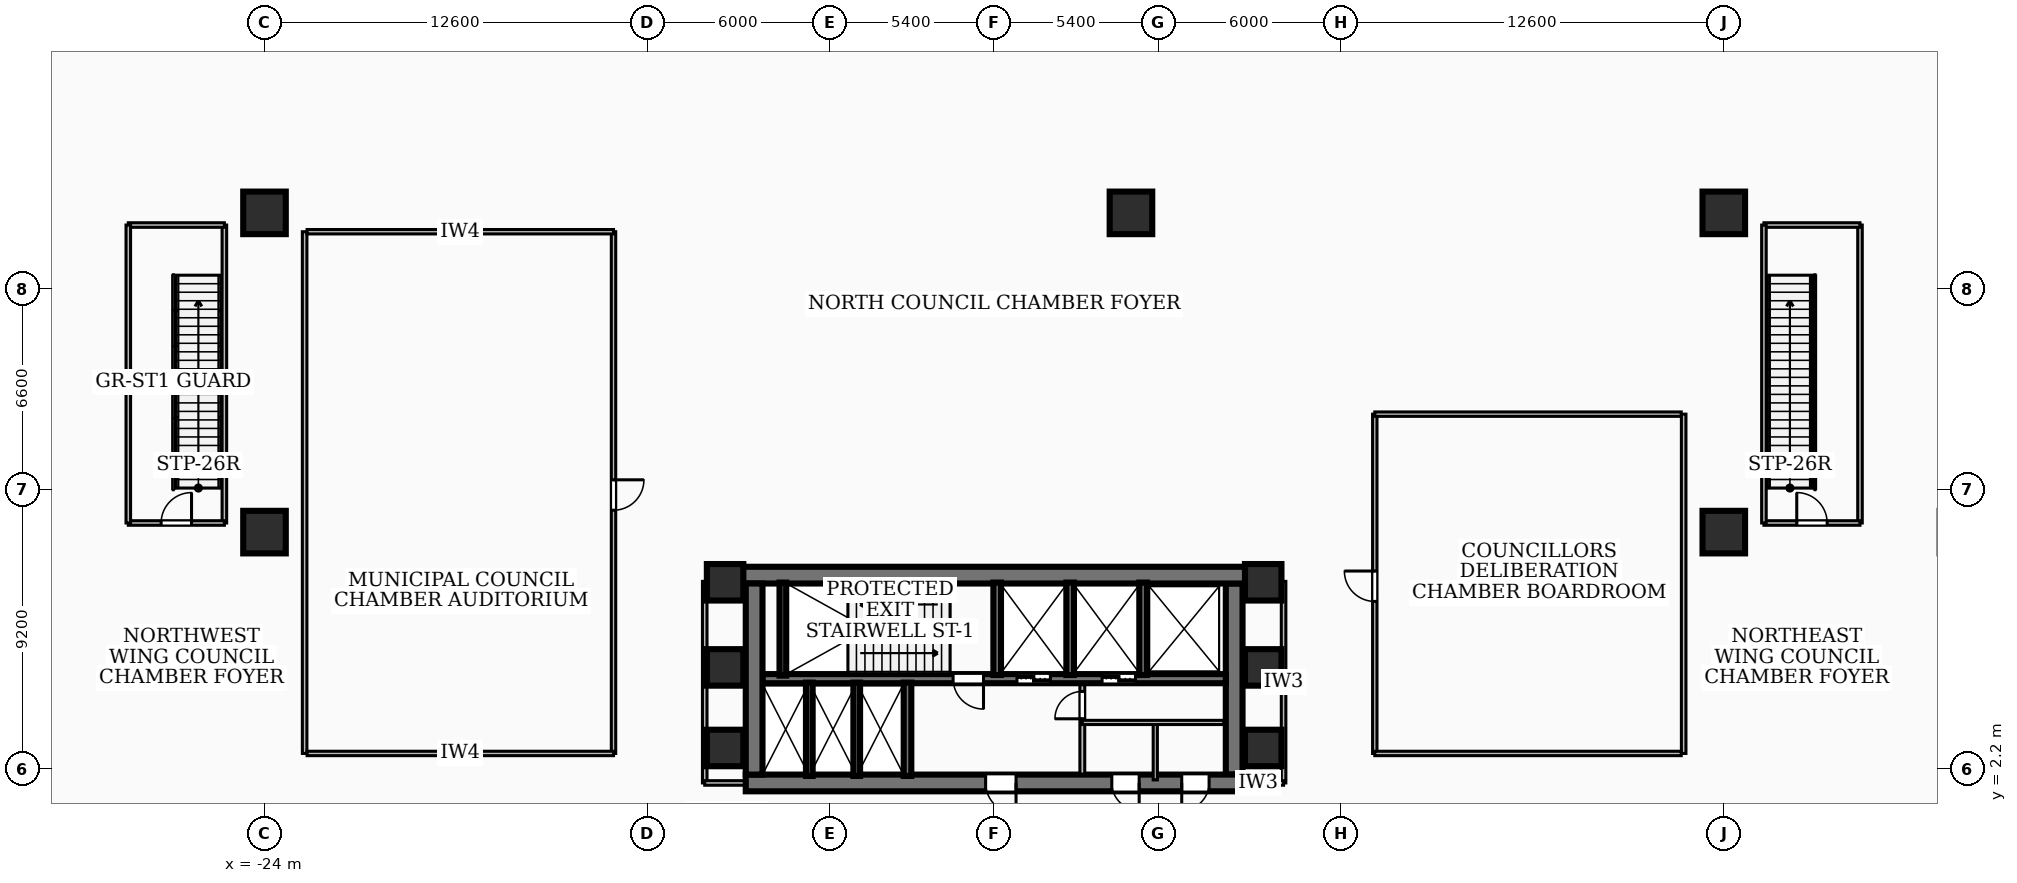
"""IFC4 building model, lengths in metres.
Left out: names, types, materials, properties, quantities, classifications, styles, units other than length and angle.
Written with IfcOpenShell. Run it as: python <this file> out.ifc"""

import sys

from ifc_helpers import new_model, si_unit, direction, frame, frame_2d, origin, origin_2d, place, context, subcontext, project, spatial, rectangle, extrude, element, fill, save


model = new_model("IFC4")
c1 = context("Model", 3, precision=1e-05, world=origin(), true_north=direction((0.0, 1.0)))
c2 = subcontext(c1, "Body", "Model", "MODEL_VIEW")
j1 = project(units=[si_unit("LENGTHUNIT", "METRE"), si_unit("PLANEANGLEUNIT", "RADIAN")], contexts=[c1])
p1 = place(None, origin())
s1 = spatial("IfcSite", under=j1, at=p1, CompositionType="ELEMENT")
p2 = place(p1, origin())
s2 = spatial("IfcBuilding", under=s1, at=p2, CompositionType="ELEMENT")
p3 = place(p2, frame((0.0, 0.0, 10.08)))
s3 = spatial("IfcBuildingStorey", under=s2, at=p3, CompositionType="ELEMENT", Elevation=10.08)
p4 = place(p3, frame((-8.78, 8.585, 0.0), z_axis=(0.0, 0.0, 1.0), x_axis=(1.0, 0.0, 0.0)))
e1 = element("IfcWall", 1, at=p4, inside=s3, PredefinedType="SHEAR", context=c2, shape_type="SweptSolid", body=[
    extrude(rectangle(XDim=17.56, YDim=0.55, at=frame_2d((8.78, 0.0))), origin(), (0.0, 0.0, 1.0), 4.36),
])
p5 = place(p3, frame((8.17, 1.75, 0.0), z_axis=(0.0, 0.0, 1.0), x_axis=(-1.0, 0.0, 0.0)))
e2 = element("IfcWall", 2, at=p5, inside=s3, PredefinedType="SHEAR", context=c2, shape_type="SweptSolid", body=[
    extrude(rectangle(XDim=16.34, YDim=0.55, at=frame_2d((8.17, 0.0))), origin(), (0.0, 0.0, 1.0), 4.36),
])
p6 = place(p5, frame((7.45, 0.0, 0.0)))
e3 = element("IfcOpeningElement", 3, at=p6, cuts=e2, PredefinedType="OPENING", context=c2, shape_type="SweptSolid", body=[
    extrude(rectangle(XDim=1.0, YDim=2.1, at=frame_2d((0.5, 1.05))), frame((0.0, 0.285, 0.0), z_axis=(0.0, -1.0, 0.0), x_axis=(1.0, 0.0, 0.0)), (0.0, 0.0, 1.0), 0.57),
])
p7 = place(p5, frame((3.4, 0.0, 0.0)))
e4 = element("IfcOpeningElement", 4, at=p7, cuts=e2, PredefinedType="OPENING", context=c2, shape_type="SweptSolid", body=[
    extrude(rectangle(XDim=0.9, YDim=2.06, at=frame_2d((0.45, 1.03))), frame((0.0, 0.285, 0.0), z_axis=(0.0, -1.0, 0.0), x_axis=(1.0, 0.0, 0.0)), (0.0, 0.0, 1.0), 0.57),
])
p8 = place(p5, frame((1.1, 0.0, 0.0)))
e5 = element("IfcOpeningElement", 5, at=p8, cuts=e2, PredefinedType="OPENING", context=c2, shape_type="SweptSolid", body=[
    extrude(rectangle(XDim=0.9, YDim=2.06, at=frame_2d((0.45, 1.03))), frame((0.0, 0.285, 0.0), z_axis=(0.0, -1.0, 0.0), x_axis=(1.0, 0.0, 0.0)), (0.0, 0.0, 1.0), 0.57),
])
for number, where, z_axis, x_axis in (
    (6, (-7.895, 2.025, 0.0), (0.0, 0.0, 1.0), (0.0, 1.0, 0.0)),
    (7, (7.895, 8.31, 0.0), (0.0, 0.0, 1.0), (0.0, -1.0, 0.0)),
):
    element("IfcWall", number, at=place(p3, frame(where, z_axis=z_axis, x_axis=x_axis)), inside=s3, PredefinedType="SHEAR", context=c2, shape_type="SweptSolid", body=[
        extrude(rectangle(XDim=6.285, YDim=0.55, at=frame_2d((3.143, 0.0))), origin(), (0.0, 0.0, 1.0), 4.36),
    ])
p9 = place(p3, frame((7.62, 5.18, 0.0), z_axis=(0.0, 0.0, 1.0), x_axis=(-1.0, 0.0, 0.0)))
e8 = element("IfcWall", 8, at=p9, inside=s3, PredefinedType="SOLIDWALL", context=c2, shape_type="SweptSolid", body=[
    extrude(rectangle(XDim=15.24, YDim=0.3, at=frame_2d((7.62, 0.0))), origin(), (0.0, 0.0, 1.0), 4.36),
])
p10 = place(p9, frame((5.77, 0.0, 0.0)))
e9 = element("IfcOpeningElement", 9, at=p10, cuts=e8, PredefinedType="OPENING", context=c2, shape_type="SweptSolid", body=[
    extrude(rectangle(XDim=1.1, YDim=2.15, at=frame_2d((0.55, 1.075))), frame((0.0, 0.16, 0.0), z_axis=(0.0, -1.0, 0.0), x_axis=(1.0, 0.0, 0.0)), (0.0, 0.0, 1.0), 0.32),
])
p11 = place(p9, frame((2.97, 0.0, 0.0)))
e10 = element("IfcOpeningElement", 10, at=p11, cuts=e8, PredefinedType="OPENING", context=c2, shape_type="SweptSolid", body=[
    extrude(rectangle(XDim=1.1, YDim=2.15, at=frame_2d((0.55, 1.075))), frame((0.0, 0.16, 0.0), z_axis=(0.0, -1.0, 0.0), x_axis=(1.0, 0.0, 0.0)), (0.0, 0.0, 1.0), 0.32),
])
p12 = place(p9, frame((7.97, 0.0, 0.0)))
e11 = element("IfcOpeningElement", 11, at=p12, cuts=e8, PredefinedType="OPENING", context=c2, shape_type="SweptSolid", body=[
    extrude(rectangle(XDim=1.0, YDim=2.1, at=frame_2d((0.5, 1.05))), frame((0.0, 0.16, 0.0), z_axis=(0.0, -1.0, 0.0), x_axis=(1.0, 0.0, 0.0)), (0.0, 0.0, 1.0), 0.32),
])
p13 = place(p3, frame((-6.95, 5.28, 0.0), z_axis=(0.0, 0.0, 1.0), x_axis=(0.0, 1.0, 0.0)))
e12 = element("IfcWall", 12, at=p13, inside=s3, PredefinedType="SOLIDWALL", context=c2, shape_type="SweptSolid", body=[
    extrude(rectangle(XDim=3.06, YDim=0.22, at=frame_2d((1.53, 0.0))), origin(), (0.0, 0.0, 1.0), 4.36),
])
for number, where, z_axis, x_axis in (
    (13, (0.1, 5.3, 0.0), (0.0, 0.0, 1.0), (0.0, 1.0, 0.0)),
    (14, (2.5, 5.3, 0.0), (0.0, 0.0, 1.0), (0.0, 1.0, 0.0)),
    (15, (4.9, 5.3, 0.0), (0.0, 0.0, 1.0), (0.0, 1.0, 0.0)),
):
    element("IfcWall", number, at=place(p3, frame(where, z_axis=z_axis, x_axis=x_axis)), inside=s3, PredefinedType="SOLIDWALL", context=c2, shape_type="SweptSolid", body=[
        extrude(rectangle(XDim=3.04, YDim=0.25, at=frame_2d((1.52, 0.0))), origin(), (0.0, 0.0, 1.0), 4.36),
    ])
p14 = place(p3, frame((-2.85, 1.98, 0.0), z_axis=(0.0, 0.0, 1.0), x_axis=(0.0, 1.0, 0.0)))
e16 = element("IfcWall", 16, at=p14, inside=s3, PredefinedType="SOLIDWALL", context=c2, shape_type="SweptSolid", body=[
    extrude(rectangle(XDim=3.07, YDim=0.25, at=frame_2d((1.535, 0.0))), origin(), (0.0, 0.0, 1.0), 4.36),
])
for number, where, z_axis, x_axis in (
    (17, (-6.08, 1.98, 0.0), (0.0, 0.0, 1.0), (0.0, 1.0, 0.0)),
    (18, (-4.52, 1.98, 0.0), (0.0, 0.0, 1.0), (0.0, 1.0, 0.0)),
):
    element("IfcWall", number, at=place(p3, frame(where, z_axis=z_axis, x_axis=x_axis)), inside=s3, PredefinedType="SOLIDWALL", context=c2, shape_type="SweptSolid", body=[
        extrude(rectangle(XDim=3.07, YDim=0.22, at=frame_2d((1.535, 0.0))), origin(), (0.0, 0.0, 1.0), 4.36),
    ])
for number, where, z_axis, x_axis in (
    (19, (-8.85, 2.9, 0.0), (0.0, 0.0, 1.0), (1.0, 0.0, 0.0)),
    (20, (-8.85, 5.55, 0.0), (0.0, 0.0, 1.0), (1.0, 0.0, 0.0)),
    (21, (8.85, 2.9, 0.0), (0.0, 0.0, 1.0), (1.0, 0.0, 0.0)),
    (22, (8.85, 5.55, 0.0), (0.0, 0.0, 1.0), (1.0, 0.0, 0.0)),
    (23, (-8.85, 8.35, 0.0), (0.0, 0.0, 1.0), (1.0, 0.0, 0.0)),
    (24, (8.85, 8.35, 0.0), (0.0, 0.0, 1.0), (1.0, 0.0, 0.0)),
):
    element("IfcColumn", number, at=place(p3, frame(where, z_axis=z_axis, x_axis=x_axis)), inside=s3, PredefinedType="COLUMN", context=c2, shape_type="SweptSolid", body=[
        extrude(rectangle(XDim=1.2, YDim=1.2, at=origin_2d()), origin(), (0.0, 0.0, 1.0), 4.68),
    ])
for number, where, z_axis, x_axis in (
    (25, (-24.0, 10.0, 0.0), (0.0, 0.0, 1.0), (1.0, 0.0, 0.0)),
    (26, (24.0, 10.0, 0.0), (0.0, 0.0, 1.0), (1.0, 0.0, 0.0)),
    (27, (4.5, 20.5, 0.0), (0.0, 0.0, 1.0), (1.0, 0.0, 0.0)),
    (28, (-24.0, 20.5, 0.0), (0.0, 0.0, 1.0), (1.0, 0.0, 0.0)),
    (29, (24.0, 20.5, 0.0), (0.0, 0.0, 1.0), (1.0, 0.0, 0.0)),
):
    element("IfcColumn", number, at=place(p3, frame(where, z_axis=z_axis, x_axis=x_axis)), inside=s3, PredefinedType="COLUMN", context=c2, shape_type="SweptSolid", body=[
        extrude(rectangle(XDim=1.4, YDim=1.4, at=origin_2d()), origin(), (0.0, 0.0, 1.0), 4.68),
    ])
for number, where, z_axis, x_axis in (
    (30, (-28.48, 10.3, 0.0), (0.0, 0.0, 1.0), (0.0, 1.0, 0.0)),
    (31, (-25.32, 10.3, 0.0), (0.0, 0.0, 1.0), (0.0, 1.0, 0.0)),
):
    element("IfcWall", number, at=place(p3, frame(where, z_axis=z_axis, x_axis=x_axis)), inside=s3, PredefinedType="PARTITIONING", context=c2, shape_type="SweptSolid", body=[
        extrude(rectangle(XDim=9.8, YDim=0.15, at=frame_2d((4.9, 0.0))), origin(), (0.0, 0.0, 1.0), 4.36),
    ])
p15 = place(p3, frame((-28.48, 10.3, 0.0), z_axis=(0.0, 0.0, 1.0), x_axis=(1.0, 0.0, 0.0)))
e32 = element("IfcWall", 32, at=p15, inside=s3, PredefinedType="PARTITIONING", context=c2, shape_type="SweptSolid", body=[
    extrude(rectangle(XDim=3.16, YDim=0.15, at=frame_2d((1.58, 0.0))), origin(), (0.0, 0.0, 1.0), 3.37),
])
p16 = place(p15, frame((1.08, 0.0, 0.0)))
e33 = element("IfcOpeningElement", 33, at=p16, cuts=e32, PredefinedType="OPENING", context=c2, shape_type="SweptSolid", body=[
    extrude(rectangle(XDim=1.0, YDim=2.1, at=frame_2d((0.5, 1.05))), frame((0.0, 0.085, 0.0), z_axis=(0.0, -1.0, 0.0), x_axis=(1.0, 0.0, 0.0)), (0.0, 0.0, 1.0), 0.17),
])
p17 = place(p3, frame((-25.32, 20.1, 0.0), z_axis=(0.0, 0.0, 1.0), x_axis=(-1.0, 0.0, 0.0)))
e34 = element("IfcWall", 34, at=p17, inside=s3, PredefinedType="PARTITIONING", context=c2, shape_type="SweptSolid", body=[
    extrude(rectangle(XDim=3.16, YDim=0.15, at=frame_2d((1.58, 0.0))), origin(), (0.0, 0.0, 1.0), 4.36),
])
for number, where, z_axis, x_axis in (
    (35, (25.32, 10.3, 0.0), (0.0, 0.0, 1.0), (0.0, 1.0, 0.0)),
    (36, (28.48, 10.3, 0.0), (0.0, 0.0, 1.0), (0.0, 1.0, 0.0)),
):
    element("IfcWall", number, at=place(p3, frame(where, z_axis=z_axis, x_axis=x_axis)), inside=s3, PredefinedType="PARTITIONING", context=c2, shape_type="SweptSolid", body=[
        extrude(rectangle(XDim=9.8, YDim=0.15, at=frame_2d((4.9, 0.0))), origin(), (0.0, 0.0, 1.0), 4.36),
    ])
p18 = place(p3, frame((25.32, 10.3, 0.0), z_axis=(0.0, 0.0, 1.0), x_axis=(1.0, 0.0, 0.0)))
e37 = element("IfcWall", 37, at=p18, inside=s3, PredefinedType="PARTITIONING", context=c2, shape_type="SweptSolid", body=[
    extrude(rectangle(XDim=3.16, YDim=0.15, at=frame_2d((1.58, 0.0))), origin(), (0.0, 0.0, 1.0), 3.37),
])
p19 = place(p18, frame((1.08, 0.0, 0.0)))
e38 = element("IfcOpeningElement", 38, at=p19, cuts=e37, PredefinedType="OPENING", context=c2, shape_type="SweptSolid", body=[
    extrude(rectangle(XDim=1.0, YDim=2.1, at=frame_2d((0.5, 1.05))), frame((0.0, 0.085, 0.0), z_axis=(0.0, -1.0, 0.0), x_axis=(1.0, 0.0, 0.0)), (0.0, 0.0, 1.0), 0.17),
])
p20 = place(p3, frame((28.48, 20.1, 0.0), z_axis=(0.0, 0.0, 1.0), x_axis=(-1.0, 0.0, 0.0)))
e39 = element("IfcWall", 39, at=p20, inside=s3, PredefinedType="PARTITIONING", context=c2, shape_type="SweptSolid", body=[
    extrude(rectangle(XDim=3.16, YDim=0.15, at=frame_2d((1.58, 0.0))), origin(), (0.0, 0.0, 1.0), 4.36),
])
p21 = place(p3, frame((2.9, 2.04, 0.0), z_axis=(0.0, 0.0, 1.0), x_axis=(0.0, 1.0, 0.0)))
e40 = element("IfcWall", 40, at=p21, inside=s3, PredefinedType="PARTITIONING", context=c2, shape_type="SweptSolid", body=[
    extrude(rectangle(XDim=2.94, YDim=0.16, at=frame_2d((1.47, 0.0))), origin(), (0.0, 0.0, 1.0), 3.425),
])
p22 = place(p21, frame((1.82, 0.0, 0.0)))
e41 = element("IfcOpeningElement", 41, at=p22, cuts=e40, PredefinedType="OPENING", context=c2, shape_type="SweptSolid", body=[
    extrude(rectangle(XDim=0.9, YDim=2.06, at=frame_2d((0.45, 1.03))), frame((0.0, 0.09, 0.0), z_axis=(0.0, -1.0, 0.0), x_axis=(1.0, 0.0, 0.0)), (0.0, 0.0, 1.0), 0.18),
])
p23 = place(p3, frame((2.9, 3.74, 0.0), z_axis=(0.0, 0.0, 1.0), x_axis=(1.0, 0.0, 0.0)))
e42 = element("IfcWall", 42, at=p23, inside=s3, PredefinedType="PARTITIONING", context=c2, shape_type="SweptSolid", body=[
    extrude(rectangle(XDim=4.65, YDim=0.138, at=frame_2d((2.325, 0.0))), origin(), (0.0, 0.0, 1.0), 4.36),
])
p24 = place(p3, frame((5.3, 1.85, 0.0), z_axis=(0.0, 0.0, 1.0), x_axis=(0.0, 1.0, 0.0)))
e43 = element("IfcWall", 43, at=p24, inside=s3, PredefinedType="PARTITIONING", context=c2, shape_type="SweptSolid", body=[
    extrude(rectangle(XDim=1.89, YDim=0.138, at=frame_2d((0.945, 0.0))), origin(), (0.0, 0.0, 1.0), 3.425),
])
p25 = place(p3, frame((-9.52, 1.75, 0.0), z_axis=(0.0, 0.0, 1.0), x_axis=(0.0, 1.0, 0.0)))
e44 = element("IfcWall", 44, at=p25, inside=s3, PredefinedType="PARTITIONING", context=c2, shape_type="SweptSolid", body=[
    extrude(rectangle(XDim=6.63, YDim=0.15, at=frame_2d((3.315, 0.0))), origin(), (0.0, 0.0, 1.0), 3.37),
])
p26 = place(p3, frame((-7.85, 1.75, 0.0), z_axis=(0.0, 0.0, 1.0), x_axis=(-1.0, 0.0, 0.0)))
e45 = element("IfcWall", 45, at=p26, inside=s3, PredefinedType="PARTITIONING", context=c2, shape_type="SweptSolid", body=[
    extrude(rectangle(XDim=1.67, YDim=0.15, at=frame_2d((0.835, 0.0))), origin(), (0.0, 0.0, 1.0), 3.425),
])
p27 = place(p3, frame((9.52, 1.75, 0.0), z_axis=(0.0, 0.0, 1.0), x_axis=(0.0, 1.0, 0.0)))
e46 = element("IfcWall", 46, at=p27, inside=s3, PredefinedType="PARTITIONING", context=c2, shape_type="SweptSolid", body=[
    extrude(rectangle(XDim=6.63, YDim=0.15, at=frame_2d((3.315, 0.0))), origin(), (0.0, 0.0, 1.0), 3.37),
])
p28 = place(p3, frame((7.85, 1.75, 0.0), z_axis=(0.0, 0.0, 1.0), x_axis=(1.0, 0.0, 0.0)))
e47 = element("IfcWall", 47, at=p28, inside=s3, PredefinedType="PARTITIONING", context=c2, shape_type="SweptSolid", body=[
    extrude(rectangle(XDim=1.67, YDim=0.15, at=frame_2d((0.835, 0.0))), origin(), (0.0, 0.0, 1.0), 3.425),
])
p29 = place(p3, frame((-12.52, 19.88, 0.0), z_axis=(0.0, 0.0, 1.0), x_axis=(0.0, -1.0, 0.0)))
e48 = element("IfcWall", 48, at=p29, inside=s3, PredefinedType="PARTITIONING", context=c2, shape_type="SweptSolid", body=[
    extrude(rectangle(XDim=17.16, YDim=0.145, at=frame_2d((8.58, 0.0))), origin(), (0.0, 0.0, 1.0), 3.37),
])
p30 = place(p29, frame((8.16, 0.0, 0.0)))
e49 = element("IfcOpeningElement", 49, at=p30, cuts=e48, PredefinedType="OPENING", context=c2, shape_type="SweptSolid", body=[
    extrude(rectangle(XDim=1.0, YDim=2.1, at=frame_2d((0.5, 1.05))), frame((0.0, 0.083, 0.0), z_axis=(0.0, -1.0, 0.0), x_axis=(1.0, 0.0, 0.0)), (0.0, 0.0, 1.0), 0.165),
])
for number, where, z_axis, x_axis in (
    (50, (-22.6, 2.72, 0.0), (0.0, 0.0, 1.0), (1.0, 0.0, 0.0)),
    (51, (-22.6, 19.88, 0.0), (0.0, 0.0, 1.0), (1.0, 0.0, 0.0)),
):
    element("IfcWall", number, at=place(p3, frame(where, z_axis=z_axis, x_axis=x_axis)), inside=s3, PredefinedType="PARTITIONING", context=c2, shape_type="SweptSolid", body=[
        extrude(rectangle(XDim=10.08, YDim=0.145, at=frame_2d((5.04, 0.0))), origin(), (0.0, 0.0, 1.0), 4.36),
    ])
p31 = place(p3, frame((-22.68, 2.72, 0.0), z_axis=(0.0, 0.0, 1.0), x_axis=(0.0, 1.0, 0.0)))
e52 = element("IfcWall", 52, at=p31, inside=s3, PredefinedType="PARTITIONING", context=c2, shape_type="SweptSolid", body=[
    extrude(rectangle(XDim=17.16, YDim=0.15, at=frame_2d((8.58, 0.0))), origin(), (0.0, 0.0, 1.0), 3.37),
])
p32 = place(p3, frame((12.52, 2.72, 0.0), z_axis=(0.0, 0.0, 1.0), x_axis=(0.0, 1.0, 0.0)))
e53 = element("IfcWall", 53, at=p32, inside=s3, PredefinedType="PARTITIONING", context=c2, shape_type="SweptSolid", body=[
    extrude(rectangle(XDim=11.16, YDim=0.145, at=frame_2d((5.58, 0.0))), origin(), (0.0, 0.0, 1.0), 3.37),
])
p33 = place(p32, frame((5.0, 0.0, 0.0)))
e54 = element("IfcOpeningElement", 54, at=p33, cuts=e53, PredefinedType="OPENING", context=c2, shape_type="SweptSolid", body=[
    extrude(rectangle(XDim=1.0, YDim=2.1, at=frame_2d((0.5, 1.05))), frame((0.0, 0.083, 0.0), z_axis=(0.0, -1.0, 0.0), x_axis=(1.0, 0.0, 0.0)), (0.0, 0.0, 1.0), 0.165),
])
for number, where, z_axis, x_axis in (
    (55, (12.52, 2.72, 0.0), (0.0, 0.0, 1.0), (1.0, 0.0, 0.0)),
    (56, (12.52, 13.88, 0.0), (0.0, 0.0, 1.0), (1.0, 0.0, 0.0)),
):
    element("IfcWall", number, at=place(p3, frame(where, z_axis=z_axis, x_axis=x_axis)), inside=s3, PredefinedType="PARTITIONING", context=c2, shape_type="SweptSolid", body=[
        extrude(rectangle(XDim=10.08, YDim=0.145, at=frame_2d((5.04, 0.0))), origin(), (0.0, 0.0, 1.0), 4.36),
    ])
p34 = place(p3, frame((22.68, 2.72, 0.0), z_axis=(0.0, 0.0, 1.0), x_axis=(0.0, 1.0, 0.0)))
e57 = element("IfcWall", 57, at=p34, inside=s3, PredefinedType="PARTITIONING", context=c2, shape_type="SweptSolid", body=[
    extrude(rectangle(XDim=11.16, YDim=0.15, at=frame_2d((5.58, 0.0))), origin(), (0.0, 0.0, 1.0), 3.37),
])
p35 = place(p16, origin())
e58 = element("IfcDoor", 58, at=p35, inside=s3, OperationType="SINGLE_SWING_RIGHT", PredefinedType="DOOR", context=c2, shape_type="SweptSolid", body=[
    extrude(rectangle(XDim=1.0, YDim=2.1, at=frame_2d((0.5, 1.05))), frame((0.0, 0.025, 0.0), z_axis=(0.0, -1.0, 0.0), x_axis=(1.0, 0.0, 0.0)), (0.0, 0.0, 1.0), 0.05),
])
fill(e33, e58)
p36 = place(p19, origin())
e59 = element("IfcDoor", 59, at=p36, inside=s3, OperationType="SINGLE_SWING_LEFT", PredefinedType="DOOR", context=c2, shape_type="SweptSolid", body=[
    extrude(rectangle(XDim=1.0, YDim=2.1, at=frame_2d((0.5, 1.05))), frame((0.0, 0.025, 0.0), z_axis=(0.0, -1.0, 0.0), x_axis=(1.0, 0.0, 0.0)), (0.0, 0.0, 1.0), 0.05),
])
fill(e38, e59)
p37 = place(p6, origin())
e60 = element("IfcDoor", 60, at=p37, inside=s3, OperationType="SINGLE_SWING_LEFT", PredefinedType="DOOR", context=c2, shape_type="SweptSolid", body=[
    extrude(rectangle(XDim=1.0, YDim=2.1, at=frame_2d((0.5, 1.05))), frame((0.0, 0.025, 0.0), z_axis=(0.0, -1.0, 0.0), x_axis=(1.0, 0.0, 0.0)), (0.0, 0.0, 1.0), 0.05),
])
fill(e3, e60)
p38 = place(p10, origin())
e61 = element("IfcDoor", 61, at=p38, inside=s3, OperationType="DOUBLE_DOOR_SLIDING", PredefinedType="DOOR", context=c2, shape_type="SweptSolid", body=[
    extrude(rectangle(XDim=1.1, YDim=2.15, at=frame_2d((0.55, 1.075))), frame((0.0, 0.025, 0.0), z_axis=(0.0, -1.0, 0.0), x_axis=(1.0, 0.0, 0.0)), (0.0, 0.0, 1.0), 0.05),
])
fill(e9, e61)
p39 = place(p11, origin())
e62 = element("IfcDoor", 62, at=p39, inside=s3, OperationType="DOUBLE_DOOR_SLIDING", PredefinedType="DOOR", context=c2, shape_type="SweptSolid", body=[
    extrude(rectangle(XDim=1.1, YDim=2.15, at=frame_2d((0.55, 1.075))), frame((0.0, 0.025, 0.0), z_axis=(0.0, -1.0, 0.0), x_axis=(1.0, 0.0, 0.0)), (0.0, 0.0, 1.0), 0.05),
])
fill(e10, e62)
p40 = place(p12, origin())
e63 = element("IfcDoor", 63, at=p40, inside=s3, OperationType="SINGLE_SWING_LEFT", PredefinedType="DOOR", context=c2, shape_type="SweptSolid", body=[
    extrude(rectangle(XDim=1.0, YDim=2.1, at=frame_2d((0.5, 1.05))), frame((0.0, 0.025, 0.0), z_axis=(0.0, -1.0, 0.0), x_axis=(1.0, 0.0, 0.0)), (0.0, 0.0, 1.0), 0.05),
])
fill(e11, e63)
p41 = place(p7, origin())
e64 = element("IfcDoor", 64, at=p41, inside=s3, OperationType="SINGLE_SWING_LEFT", PredefinedType="DOOR", context=c2, shape_type="SweptSolid", body=[
    extrude(rectangle(XDim=0.9, YDim=2.06, at=frame_2d((0.45, 1.03))), frame((0.0, 0.025, 0.0), z_axis=(0.0, -1.0, 0.0), x_axis=(1.0, 0.0, 0.0)), (0.0, 0.0, 1.0), 0.05),
])
fill(e4, e64)
p42 = place(p8, origin())
e65 = element("IfcDoor", 65, at=p42, inside=s3, OperationType="SINGLE_SWING_RIGHT", PredefinedType="DOOR", context=c2, shape_type="SweptSolid", body=[
    extrude(rectangle(XDim=0.9, YDim=2.06, at=frame_2d((0.45, 1.03))), frame((0.0, 0.025, 0.0), z_axis=(0.0, -1.0, 0.0), x_axis=(1.0, 0.0, 0.0)), (0.0, 0.0, 1.0), 0.05),
])
fill(e5, e65)
p43 = place(p22, origin())
e66 = element("IfcDoor", 66, at=p43, inside=s3, OperationType="SINGLE_SWING_LEFT", PredefinedType="DOOR", context=c2, shape_type="SweptSolid", body=[
    extrude(rectangle(XDim=0.9, YDim=2.06, at=frame_2d((0.45, 1.03))), frame((0.0, 0.025, 0.0), z_axis=(0.0, -1.0, 0.0), x_axis=(1.0, 0.0, 0.0)), (0.0, 0.0, 1.0), 0.05),
])
fill(e41, e66)
p44 = place(p30, origin())
e67 = element("IfcDoor", 67, at=p44, inside=s3, OperationType="SINGLE_SWING_LEFT", PredefinedType="DOOR", context=c2, shape_type="SweptSolid", body=[
    extrude(rectangle(XDim=1.0, YDim=2.1, at=frame_2d((0.5, 1.05))), frame((0.0, 0.025, 0.0), z_axis=(0.0, -1.0, 0.0), x_axis=(1.0, 0.0, 0.0)), (0.0, 0.0, 1.0), 0.05),
])
fill(e49, e67)
p45 = place(p33, origin())
e68 = element("IfcDoor", 68, at=p45, inside=s3, OperationType="SINGLE_SWING_RIGHT", PredefinedType="DOOR", context=c2, shape_type="SweptSolid", body=[
    extrude(rectangle(XDim=1.0, YDim=2.1, at=frame_2d((0.5, 1.05))), frame((0.0, 0.025, 0.0), z_axis=(0.0, -1.0, 0.0), x_axis=(1.0, 0.0, 0.0)), (0.0, 0.0, 1.0), 0.05),
])
fill(e54, e68)
save(model, sys.argv[1])
